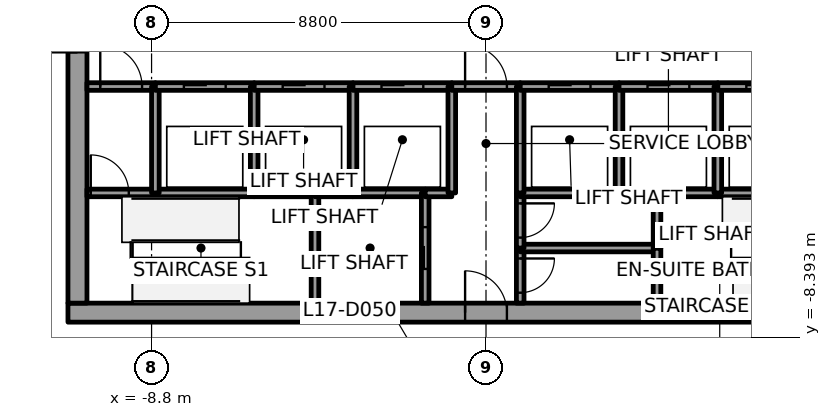
"""IFC4 building model, lengths in metres.
Left out: names, types, materials, properties, quantities, classifications, styles, units other than length and angle.
Written with IfcOpenShell. Run it as: python <this file> out.ifc"""

import sys

from ifc_helpers import new_model, si_unit, direction, frame, frame_2d, origin, place, context, subcontext, project, spatial, rectangle, extrude, element, fill, save


model = new_model("IFC4")
c1 = context("Model", 3, precision=1e-05, world=origin(), true_north=direction((0.0, 1.0)))
c2 = subcontext(c1, "Body", "Model", "MODEL_VIEW")
j1 = project(units=[si_unit("LENGTHUNIT", "METRE"), si_unit("PLANEANGLEUNIT", "RADIAN")], contexts=[c1])
p1 = place(None, origin())
s1 = spatial("IfcSite", under=j1, at=p1, CompositionType="ELEMENT")
p2 = place(p1, origin())
s2 = spatial("IfcBuilding", under=s1, at=p2, CompositionType="ELEMENT")
p3 = place(p2, frame((0.0, 0.0, 85.0)))
s3 = spatial("IfcBuildingStorey", under=s2, at=p3, CompositionType="ELEMENT", Elevation=85.0)
p4 = place(p3, frame((-11.0, -7.75, 0.0), z_axis=(0.0, 0.0, 1.0), x_axis=(1.0, 0.0, 0.0)))
e1 = element("IfcWall", 1, at=p4, inside=s3, PredefinedType="SHEAR", context=c2, shape_type="SweptSolid", body=[
    extrude(rectangle(XDim=22.0, YDim=0.5, at=frame_2d((11.0, 0.0))), origin(), (0.0, 0.0, 1.0), 3.7),
])
p5 = place(p4, frame((10.45, 0.0, 0.0)))
e2 = element("IfcOpeningElement", 2, at=p5, cuts=e1, PredefinedType="OPENING", context=c2, shape_type="SweptSolid", body=[
    extrude(rectangle(XDim=1.1, YDim=2.1, at=frame_2d((0.55, 1.05))), frame((0.0, 0.25, 0.0), z_axis=(0.0, -1.0, 0.0), x_axis=(1.0, 0.0, 0.0)), (0.0, 0.0, 1.0), 0.5),
])
p6 = place(p3, frame((-10.75, -7.5, 0.0), z_axis=(0.0, 0.0, 1.0), x_axis=(0.0, 1.0, 0.0)))
e3 = element("IfcWall", 3, at=p6, inside=s3, PredefinedType="SHEAR", context=c2, shape_type="SweptSolid", body=[
    extrude(rectangle(XDim=15.0, YDim=0.5, at=frame_2d((7.5, 0.0))), origin(), (0.0, 0.0, 1.0), 3.7),
])
p7 = place(p6, frame((6.6, 0.0, 0.0)))
e4 = element("IfcOpeningElement", 4, at=p7, cuts=e3, PredefinedType="OPENING", context=c2, shape_type="SweptSolid", body=[
    extrude(rectangle(XDim=1.8, YDim=2.1, at=frame_2d((0.9, 1.05))), frame((0.0, 0.25, 0.0), z_axis=(0.0, -1.0, 0.0), x_axis=(1.0, 0.0, 0.0)), (0.0, 0.0, 1.0), 0.5),
])
p8 = place(p3, frame((-10.5, -4.6, 0.0), z_axis=(0.0, 0.0, 1.0), x_axis=(1.0, 0.0, 0.0)))
e5 = element("IfcWall", 5, at=p8, inside=s3, PredefinedType="SOLIDWALL", context=c2, shape_type="SweptSolid", body=[
    extrude(rectangle(XDim=1.8, YDim=0.2, at=frame_2d((0.9, 0.0))), origin(), (0.0, 0.0, 1.0), 3.55),
])
p9 = place(p8, frame((0.1, 0.0, 0.0)))
e6 = element("IfcOpeningElement", 6, at=p9, cuts=e5, PredefinedType="OPENING", context=c2, shape_type="SweptSolid", body=[
    extrude(rectangle(XDim=1.0, YDim=2.1, at=frame_2d((0.5, 1.05))), frame((0.0, 0.1, 0.0), z_axis=(0.0, -1.0, 0.0), x_axis=(1.0, 0.0, 0.0)), (0.0, 0.0, 1.0), 0.2),
])
p10 = place(p3, frame((-10.5, -1.8, 0.0), z_axis=(0.0, 0.0, 1.0), x_axis=(1.0, 0.0, 0.0)))
e7 = element("IfcWall", 7, at=p10, inside=s3, PredefinedType="SOLIDWALL", context=c2, shape_type="SweptSolid", body=[
    extrude(rectangle(XDim=1.8, YDim=0.2, at=frame_2d((0.9, 0.0))), origin(), (0.0, 0.0, 1.0), 3.55),
])
p11 = place(p10, frame((0.35, 0.0, 0.0)))
e8 = element("IfcOpeningElement", 8, at=p11, cuts=e7, PredefinedType="OPENING", context=c2, shape_type="SweptSolid", body=[
    extrude(rectangle(XDim=1.1, YDim=2.1, at=frame_2d((0.55, 1.05))), frame((0.0, 0.1, 0.0), z_axis=(0.0, -1.0, 0.0), x_axis=(1.0, 0.0, 0.0)), (0.0, 0.0, 1.0), 0.2),
])
p12 = place(p3, frame((-8.7, -4.6, 0.0), z_axis=(0.0, 0.0, 1.0), x_axis=(1.0, 0.0, 0.0)))
e9 = element("IfcWall", 9, at=p12, inside=s3, PredefinedType="SOLIDWALL", context=c2, shape_type="SweptSolid", body=[
    extrude(rectangle(XDim=2.6, YDim=0.2, at=frame_2d((1.3, 0.0))), origin(), (0.0, 0.0, 1.0), 3.55),
])
p13 = place(p3, frame((-8.7, -4.6, 0.0), z_axis=(0.0, 0.0, 1.0), x_axis=(0.0, 1.0, 0.0)))
e10 = element("IfcWall", 10, at=p13, inside=s3, PredefinedType="SOLIDWALL", context=c2, shape_type="SweptSolid", body=[
    extrude(rectangle(XDim=2.8, YDim=0.2, at=frame_2d((1.4, 0.0))), origin(), (0.0, 0.0, 1.0), 3.55),
])
p14 = place(p3, frame((-8.7, -1.8, 0.0), z_axis=(0.0, 0.0, 1.0), x_axis=(1.0, 0.0, 0.0)))
e11 = element("IfcWall", 11, at=p14, inside=s3, PredefinedType="SOLIDWALL", context=c2, shape_type="SweptSolid", body=[
    extrude(rectangle(XDim=2.6, YDim=0.2, at=frame_2d((1.3, 0.0))), origin(), (0.0, 0.0, 1.0), 3.55),
])
p15 = place(p14, frame((0.75, 0.0, 0.0)))
e12 = element("IfcOpeningElement", 12, at=p15, cuts=e11, PredefinedType="OPENING", context=c2, shape_type="SweptSolid", body=[
    extrude(rectangle(XDim=1.1, YDim=2.1, at=frame_2d((0.55, 1.05))), frame((0.0, 0.1, 0.0), z_axis=(0.0, -1.0, 0.0), x_axis=(1.0, 0.0, 0.0)), (0.0, 0.0, 1.0), 0.2),
])
p16 = place(p3, frame((-6.1, -4.6, 0.0), z_axis=(0.0, 0.0, 1.0), x_axis=(1.0, 0.0, 0.0)))
e13 = element("IfcWall", 13, at=p16, inside=s3, PredefinedType="SOLIDWALL", context=c2, shape_type="SweptSolid", body=[
    extrude(rectangle(XDim=1.6, YDim=0.2, at=frame_2d((0.8, 0.0))), origin(), (0.0, 0.0, 1.0), 3.55),
])
p17 = place(p3, frame((-6.1, -4.6, 0.0), z_axis=(0.0, 0.0, 1.0), x_axis=(0.0, 1.0, 0.0)))
e14 = element("IfcWall", 14, at=p17, inside=s3, PredefinedType="SOLIDWALL", context=c2, shape_type="SweptSolid", body=[
    extrude(rectangle(XDim=2.8, YDim=0.2, at=frame_2d((1.4, 0.0))), origin(), (0.0, 0.0, 1.0), 3.55),
])
p18 = place(p3, frame((-6.1, -1.8, 0.0), z_axis=(0.0, 0.0, 1.0), x_axis=(1.0, 0.0, 0.0)))
e15 = element("IfcWall", 15, at=p18, inside=s3, PredefinedType="SOLIDWALL", context=c2, shape_type="SweptSolid", body=[
    extrude(rectangle(XDim=2.6, YDim=0.2, at=frame_2d((1.3, 0.0))), origin(), (0.0, 0.0, 1.0), 3.55),
])
p19 = place(p18, frame((0.75, 0.0, 0.0)))
e16 = element("IfcOpeningElement", 16, at=p19, cuts=e15, PredefinedType="OPENING", context=c2, shape_type="SweptSolid", body=[
    extrude(rectangle(XDim=1.1, YDim=2.1, at=frame_2d((0.55, 1.05))), frame((0.0, 0.1, 0.0), z_axis=(0.0, -1.0, 0.0), x_axis=(1.0, 0.0, 0.0)), (0.0, 0.0, 1.0), 0.2),
])
p20 = place(p3, frame((-4.5, -4.6, 0.0), z_axis=(0.0, 0.0, 1.0), x_axis=(0.0, -1.0, 0.0)))
e17 = element("IfcWall", 17, at=p20, inside=s3, PredefinedType="SOLIDWALL", context=c2, shape_type="SweptSolid", body=[
    extrude(rectangle(XDim=2.9, YDim=0.2, at=frame_2d((1.45, 0.0))), origin(), (0.0, 0.0, 1.0), 3.55),
])
p21 = place(p3, frame((-4.5, -4.6, 0.0), z_axis=(0.0, 0.0, 1.0), x_axis=(1.0, 0.0, 0.0)))
e18 = element("IfcWall", 18, at=p21, inside=s3, PredefinedType="SOLIDWALL", context=c2, shape_type="SweptSolid", body=[
    extrude(rectangle(XDim=1.0, YDim=0.2, at=frame_2d((0.5, 0.0))), origin(), (0.0, 0.0, 1.0), 3.55),
])
p22 = place(p3, frame((-3.5, -4.6, 0.0), z_axis=(0.0, 0.0, 1.0), x_axis=(1.0, 0.0, 0.0)))
e19 = element("IfcWall", 19, at=p22, inside=s3, PredefinedType="SOLIDWALL", context=c2, shape_type="SweptSolid", body=[
    extrude(rectangle(XDim=1.9, YDim=0.2, at=frame_2d((0.95, 0.0))), origin(), (0.0, 0.0, 1.0), 3.55),
])
p23 = place(p3, frame((-3.5, -4.6, 0.0), z_axis=(0.0, 0.0, 1.0), x_axis=(0.0, 1.0, 0.0)))
e20 = element("IfcWall", 20, at=p23, inside=s3, PredefinedType="SOLIDWALL", context=c2, shape_type="SweptSolid", body=[
    extrude(rectangle(XDim=2.8, YDim=0.2, at=frame_2d((1.4, 0.0))), origin(), (0.0, 0.0, 1.0), 3.55),
])
p24 = place(p3, frame((-3.5, -1.8, 0.0), z_axis=(0.0, 0.0, 1.0), x_axis=(1.0, 0.0, 0.0)))
e21 = element("IfcWall", 21, at=p24, inside=s3, PredefinedType="SOLIDWALL", context=c2, shape_type="SweptSolid", body=[
    extrude(rectangle(XDim=2.6, YDim=0.2, at=frame_2d((1.3, 0.0))), origin(), (0.0, 0.0, 1.0), 3.55),
])
p25 = place(p24, frame((0.75, 0.0, 0.0)))
e22 = element("IfcOpeningElement", 22, at=p25, cuts=e21, PredefinedType="OPENING", context=c2, shape_type="SweptSolid", body=[
    extrude(rectangle(XDim=1.1, YDim=2.1, at=frame_2d((0.55, 1.05))), frame((0.0, 0.1, 0.0), z_axis=(0.0, -1.0, 0.0), x_axis=(1.0, 0.0, 0.0)), (0.0, 0.0, 1.0), 0.2),
])
p26 = place(p3, frame((-1.6, -7.5, 0.0), z_axis=(0.0, 0.0, 1.0), x_axis=(0.0, 1.0, 0.0)))
e23 = element("IfcWall", 23, at=p26, inside=s3, PredefinedType="SOLIDWALL", context=c2, shape_type="SweptSolid", body=[
    extrude(rectangle(XDim=2.9, YDim=0.2, at=frame_2d((1.45, 0.0))), origin(), (0.0, 0.0, 1.0), 3.55),
])
p27 = place(p26, frame((0.9, 0.0, 0.0)))
e24 = element("IfcOpeningElement", 24, at=p27, cuts=e23, PredefinedType="OPENING", context=c2, shape_type="SweptSolid", body=[
    extrude(rectangle(XDim=1.1, YDim=2.1, at=frame_2d((0.55, 1.05))), frame((0.0, 0.1, 0.0), z_axis=(0.0, -1.0, 0.0), x_axis=(1.0, 0.0, 0.0)), (0.0, 0.0, 1.0), 0.2),
])
p28 = place(p3, frame((-1.6, -4.6, 0.0), z_axis=(0.0, 0.0, 1.0), x_axis=(1.0, 0.0, 0.0)))
e25 = element("IfcWall", 25, at=p28, inside=s3, PredefinedType="SOLIDWALL", context=c2, shape_type="SweptSolid", body=[
    extrude(rectangle(XDim=0.7, YDim=0.2, at=frame_2d((0.35, 0.0))), origin(), (0.0, 0.0, 1.0), 3.55),
])
p29 = place(p3, frame((-0.9, -4.6, 0.0), z_axis=(0.0, 0.0, 1.0), x_axis=(0.0, 1.0, 0.0)))
e26 = element("IfcWall", 26, at=p29, inside=s3, PredefinedType="SOLIDWALL", context=c2, shape_type="SweptSolid", body=[
    extrude(rectangle(XDim=2.8, YDim=0.2, at=frame_2d((1.4, 0.0))), origin(), (0.0, 0.0, 1.0), 3.55),
])
p30 = place(p3, frame((-0.9, -1.8, 0.0), z_axis=(0.0, 0.0, 1.0), x_axis=(1.0, 0.0, 0.0)))
e27 = element("IfcWall", 27, at=p30, inside=s3, PredefinedType="SOLIDWALL", context=c2, shape_type="SweptSolid", body=[
    extrude(rectangle(XDim=1.8, YDim=0.2, at=frame_2d((0.9, 0.0))), origin(), (0.0, 0.0, 1.0), 3.55),
])
p31 = place(p30, frame((0.35, 0.0, 0.0)))
e28 = element("IfcOpeningElement", 28, at=p31, cuts=e27, PredefinedType="OPENING", context=c2, shape_type="SweptSolid", body=[
    extrude(rectangle(XDim=1.1, YDim=2.1, at=frame_2d((0.55, 1.05))), frame((0.0, 0.1, 0.0), z_axis=(0.0, -1.0, 0.0), x_axis=(1.0, 0.0, 0.0)), (0.0, 0.0, 1.0), 0.2),
])
p32 = place(p3, frame((0.9, -6.05, 0.0), z_axis=(0.0, 0.0, 1.0), x_axis=(0.0, -1.0, 0.0)))
e29 = element("IfcWall", 29, at=p32, inside=s3, PredefinedType="SOLIDWALL", context=c2, shape_type="SweptSolid", body=[
    extrude(rectangle(XDim=1.45, YDim=0.2, at=frame_2d((0.725, 0.0))), origin(), (0.0, 0.0, 1.0), 3.55),
])
p33 = place(p32, frame((0.275, 0.0, 0.0)))
e30 = element("IfcOpeningElement", 30, at=p33, cuts=e29, PredefinedType="OPENING", context=c2, shape_type="SweptSolid", body=[
    extrude(rectangle(XDim=0.9, YDim=2.1, at=frame_2d((0.45, 1.05))), frame((0.0, 0.1, 0.0), z_axis=(0.0, -1.0, 0.0), x_axis=(1.0, 0.0, 0.0)), (0.0, 0.0, 1.0), 0.2),
])
p34 = place(p3, frame((4.5, -6.05, 0.0), z_axis=(0.0, 0.0, 1.0), x_axis=(-1.0, 0.0, 0.0)))
e31 = element("IfcWall", 31, at=p34, inside=s3, PredefinedType="SOLIDWALL", context=c2, shape_type="SweptSolid", body=[
    extrude(rectangle(XDim=3.6, YDim=0.2, at=frame_2d((1.8, 0.0))), origin(), (0.0, 0.0, 1.0), 3.55),
])
p35 = place(p3, frame((0.9, -4.6, 0.0), z_axis=(0.0, 0.0, 1.0), x_axis=(0.0, -1.0, 0.0)))
e32 = element("IfcWall", 32, at=p35, inside=s3, PredefinedType="SOLIDWALL", context=c2, shape_type="SweptSolid", body=[
    extrude(rectangle(XDim=1.45, YDim=0.2, at=frame_2d((0.725, 0.0))), origin(), (0.0, 0.0, 1.0), 3.55),
])
p36 = place(p35, frame((0.275, 0.0, 0.0)))
e33 = element("IfcOpeningElement", 33, at=p36, cuts=e32, PredefinedType="OPENING", context=c2, shape_type="SweptSolid", body=[
    extrude(rectangle(XDim=0.9, YDim=2.1, at=frame_2d((0.45, 1.05))), frame((0.0, 0.1, 0.0), z_axis=(0.0, -1.0, 0.0), x_axis=(1.0, 0.0, 0.0)), (0.0, 0.0, 1.0), 0.2),
])
p37 = place(p3, frame((3.5, -4.6, 0.0), z_axis=(0.0, 0.0, 1.0), x_axis=(-1.0, 0.0, 0.0)))
e34 = element("IfcWall", 34, at=p37, inside=s3, PredefinedType="SOLIDWALL", context=c2, shape_type="SweptSolid", body=[
    extrude(rectangle(XDim=2.6, YDim=0.2, at=frame_2d((1.3, 0.0))), origin(), (0.0, 0.0, 1.0), 3.55),
])
p38 = place(p3, frame((0.9, -1.8, 0.0), z_axis=(0.0, 0.0, 1.0), x_axis=(0.0, -1.0, 0.0)))
e35 = element("IfcWall", 35, at=p38, inside=s3, PredefinedType="SOLIDWALL", context=c2, shape_type="SweptSolid", body=[
    extrude(rectangle(XDim=2.8, YDim=0.2, at=frame_2d((1.4, 0.0))), origin(), (0.0, 0.0, 1.0), 3.55),
])
p39 = place(p3, frame((0.9, -1.8, 0.0), z_axis=(0.0, 0.0, 1.0), x_axis=(1.0, 0.0, 0.0)))
e36 = element("IfcWall", 36, at=p39, inside=s3, PredefinedType="SOLIDWALL", context=c2, shape_type="SweptSolid", body=[
    extrude(rectangle(XDim=2.6, YDim=0.2, at=frame_2d((1.3, 0.0))), origin(), (0.0, 0.0, 1.0), 3.55),
])
p40 = place(p39, frame((0.75, 0.0, 0.0)))
e37 = element("IfcOpeningElement", 37, at=p40, cuts=e36, PredefinedType="OPENING", context=c2, shape_type="SweptSolid", body=[
    extrude(rectangle(XDim=1.1, YDim=2.1, at=frame_2d((0.55, 1.05))), frame((0.0, 0.1, 0.0), z_axis=(0.0, -1.0, 0.0), x_axis=(1.0, 0.0, 0.0)), (0.0, 0.0, 1.0), 0.2),
])
p41 = place(p3, frame((4.5, -4.6, 0.0), z_axis=(0.0, 0.0, 1.0), x_axis=(-1.0, 0.0, 0.0)))
e38 = element("IfcWall", 38, at=p41, inside=s3, PredefinedType="SOLIDWALL", context=c2, shape_type="SweptSolid", body=[
    extrude(rectangle(XDim=1.0, YDim=0.2, at=frame_2d((0.5, 0.0))), origin(), (0.0, 0.0, 1.0), 3.55),
])
p42 = place(p3, frame((3.5, -4.6, 0.0), z_axis=(0.0, 0.0, 1.0), x_axis=(0.0, 1.0, 0.0)))
e39 = element("IfcWall", 39, at=p42, inside=s3, PredefinedType="SOLIDWALL", context=c2, shape_type="SweptSolid", body=[
    extrude(rectangle(XDim=2.8, YDim=0.2, at=frame_2d((1.4, 0.0))), origin(), (0.0, 0.0, 1.0), 3.55),
])
p43 = place(p3, frame((3.5, -1.8, 0.0), z_axis=(0.0, 0.0, 1.0), x_axis=(1.0, 0.0, 0.0)))
e40 = element("IfcWall", 40, at=p43, inside=s3, PredefinedType="SOLIDWALL", context=c2, shape_type="SweptSolid", body=[
    extrude(rectangle(XDim=2.6, YDim=0.2, at=frame_2d((1.3, 0.0))), origin(), (0.0, 0.0, 1.0), 3.55),
])
p44 = place(p43, frame((0.75, 0.0, 0.0)))
e41 = element("IfcOpeningElement", 41, at=p44, cuts=e40, PredefinedType="OPENING", context=c2, shape_type="SweptSolid", body=[
    extrude(rectangle(XDim=1.1, YDim=2.1, at=frame_2d((0.55, 1.05))), frame((0.0, 0.1, 0.0), z_axis=(0.0, -1.0, 0.0), x_axis=(1.0, 0.0, 0.0)), (0.0, 0.0, 1.0), 0.2),
])
for number, where, z_axis, x_axis in (
    (42, (4.5, -7.5, 0.0), (0.0, 0.0, 1.0), (0.0, 1.0, 0.0)),
    (43, (4.5, -6.05, 0.0), (0.0, 0.0, 1.0), (0.0, 1.0, 0.0)),
):
    element("IfcWall", number, at=place(p3, frame(where, z_axis=z_axis, x_axis=x_axis)), inside=s3, PredefinedType="SOLIDWALL", context=c2, shape_type="SweptSolid", body=[
        extrude(rectangle(XDim=1.45, YDim=0.2, at=frame_2d((0.725, 0.0))), origin(), (0.0, 0.0, 1.0), 3.55),
    ])
p45 = place(p3, frame((4.5, -4.6, 0.0), z_axis=(0.0, 0.0, 1.0), x_axis=(1.0, 0.0, 0.0)))
e44 = element("IfcWall", 44, at=p45, inside=s3, PredefinedType="SOLIDWALL", context=c2, shape_type="SweptSolid", body=[
    extrude(rectangle(XDim=1.6, YDim=0.2, at=frame_2d((0.8, 0.0))), origin(), (0.0, 0.0, 1.0), 3.55),
])
p46 = place(p3, frame((6.1, -4.6, 0.0), z_axis=(0.0, 0.0, 1.0), x_axis=(1.0, 0.0, 0.0)))
e45 = element("IfcWall", 45, at=p46, inside=s3, PredefinedType="SOLIDWALL", context=c2, shape_type="SweptSolid", body=[
    extrude(rectangle(XDim=2.6, YDim=0.2, at=frame_2d((1.3, 0.0))), origin(), (0.0, 0.0, 1.0), 3.55),
])
p47 = place(p3, frame((6.1, -4.6, 0.0), z_axis=(0.0, 0.0, 1.0), x_axis=(0.0, 1.0, 0.0)))
e46 = element("IfcWall", 46, at=p47, inside=s3, PredefinedType="SOLIDWALL", context=c2, shape_type="SweptSolid", body=[
    extrude(rectangle(XDim=2.8, YDim=0.2, at=frame_2d((1.4, 0.0))), origin(), (0.0, 0.0, 1.0), 3.55),
])
p48 = place(p3, frame((6.1, -1.8, 0.0), z_axis=(0.0, 0.0, 1.0), x_axis=(1.0, 0.0, 0.0)))
e47 = element("IfcWall", 47, at=p48, inside=s3, PredefinedType="SOLIDWALL", context=c2, shape_type="SweptSolid", body=[
    extrude(rectangle(XDim=2.6, YDim=0.2, at=frame_2d((1.3, 0.0))), origin(), (0.0, 0.0, 1.0), 3.55),
])
p49 = place(p48, frame((0.75, 0.0, 0.0)))
e48 = element("IfcOpeningElement", 48, at=p49, cuts=e47, PredefinedType="OPENING", context=c2, shape_type="SweptSolid", body=[
    extrude(rectangle(XDim=1.1, YDim=2.1, at=frame_2d((0.55, 1.05))), frame((0.0, 0.1, 0.0), z_axis=(0.0, -1.0, 0.0), x_axis=(1.0, 0.0, 0.0)), (0.0, 0.0, 1.0), 0.2),
])
p50 = place(p15, origin())
e49 = element("IfcDoor", 49, at=p50, inside=s3, OperationType="SLIDING_TO_RIGHT", PredefinedType="DOOR", context=c2, shape_type="SweptSolid", body=[
    extrude(rectangle(XDim=1.1, YDim=2.1, at=frame_2d((0.55, 1.05))), frame((0.0, 0.025, 0.0), z_axis=(0.0, -1.0, 0.0), x_axis=(1.0, 0.0, 0.0)), (0.0, 0.0, 1.0), 0.05),
])
fill(e12, e49)
p51 = place(p19, origin())
e50 = element("IfcDoor", 50, at=p51, inside=s3, OperationType="SLIDING_TO_RIGHT", PredefinedType="DOOR", context=c2, shape_type="SweptSolid", body=[
    extrude(rectangle(XDim=1.1, YDim=2.1, at=frame_2d((0.55, 1.05))), frame((0.0, 0.025, 0.0), z_axis=(0.0, -1.0, 0.0), x_axis=(1.0, 0.0, 0.0)), (0.0, 0.0, 1.0), 0.05),
])
fill(e16, e50)
p52 = place(p25, origin())
e51 = element("IfcDoor", 51, at=p52, inside=s3, OperationType="SLIDING_TO_RIGHT", PredefinedType="DOOR", context=c2, shape_type="SweptSolid", body=[
    extrude(rectangle(XDim=1.1, YDim=2.1, at=frame_2d((0.55, 1.05))), frame((0.0, 0.025, 0.0), z_axis=(0.0, -1.0, 0.0), x_axis=(1.0, 0.0, 0.0)), (0.0, 0.0, 1.0), 0.05),
])
fill(e22, e51)
p53 = place(p40, origin())
e52 = element("IfcDoor", 52, at=p53, inside=s3, OperationType="SLIDING_TO_RIGHT", PredefinedType="DOOR", context=c2, shape_type="SweptSolid", body=[
    extrude(rectangle(XDim=1.1, YDim=2.1, at=frame_2d((0.55, 1.05))), frame((0.0, 0.025, 0.0), z_axis=(0.0, -1.0, 0.0), x_axis=(1.0, 0.0, 0.0)), (0.0, 0.0, 1.0), 0.05),
])
fill(e37, e52)
p54 = place(p44, origin())
e53 = element("IfcDoor", 53, at=p54, inside=s3, OperationType="SLIDING_TO_LEFT", PredefinedType="DOOR", context=c2, shape_type="SweptSolid", body=[
    extrude(rectangle(XDim=1.1, YDim=2.1, at=frame_2d((0.55, 1.05))), frame((0.0, 0.025, 0.0), z_axis=(0.0, -1.0, 0.0), x_axis=(1.0, 0.0, 0.0)), (0.0, 0.0, 1.0), 0.05),
])
fill(e41, e53)
p55 = place(p49, origin())
e54 = element("IfcDoor", 54, at=p55, inside=s3, OperationType="SLIDING_TO_RIGHT", PredefinedType="DOOR", context=c2, shape_type="SweptSolid", body=[
    extrude(rectangle(XDim=1.1, YDim=2.1, at=frame_2d((0.55, 1.05))), frame((0.0, 0.025, 0.0), z_axis=(0.0, -1.0, 0.0), x_axis=(1.0, 0.0, 0.0)), (0.0, 0.0, 1.0), 0.05),
])
fill(e48, e54)
p56 = place(p27, origin())
e55 = element("IfcDoor", 55, at=p56, inside=s3, OperationType="SLIDING_TO_RIGHT", PredefinedType="DOOR", context=c2, shape_type="SweptSolid", body=[
    extrude(rectangle(XDim=1.1, YDim=2.1, at=frame_2d((0.55, 1.05))), frame((0.0, 0.025, 0.0), z_axis=(0.0, -1.0, 0.0), x_axis=(1.0, 0.0, 0.0)), (0.0, 0.0, 1.0), 0.05),
])
fill(e24, e55)
p57 = place(p11, origin())
e56 = element("IfcDoor", 56, at=p57, inside=s3, OperationType="SINGLE_SWING_RIGHT", PredefinedType="DOOR", context=c2, shape_type="SweptSolid", body=[
    extrude(rectangle(XDim=1.1, YDim=2.1, at=frame_2d((0.55, 1.05))), frame((0.0, 0.025, 0.0), z_axis=(0.0, -1.0, 0.0), x_axis=(1.0, 0.0, 0.0)), (0.0, 0.0, 1.0), 0.05),
])
fill(e8, e56)
p58 = place(p31, origin())
e57 = element("IfcDoor", 57, at=p58, inside=s3, OperationType="SINGLE_SWING_RIGHT", PredefinedType="DOOR", context=c2, shape_type="SweptSolid", body=[
    extrude(rectangle(XDim=1.1, YDim=2.1, at=frame_2d((0.55, 1.05))), frame((0.0, 0.025, 0.0), z_axis=(0.0, -1.0, 0.0), x_axis=(1.0, 0.0, 0.0)), (0.0, 0.0, 1.0), 0.05),
])
fill(e28, e57)
p59 = place(p9, origin())
e58 = element("IfcDoor", 58, at=p59, inside=s3, OperationType="SINGLE_SWING_LEFT", PredefinedType="DOOR", context=c2, shape_type="SweptSolid", body=[
    extrude(rectangle(XDim=1.0, YDim=2.1, at=frame_2d((0.5, 1.05))), frame((0.0, 0.025, 0.0), z_axis=(0.0, -1.0, 0.0), x_axis=(1.0, 0.0, 0.0)), (0.0, 0.0, 1.0), 0.05),
])
fill(e6, e58)
p60 = place(p33, origin())
e59 = element("IfcDoor", 59, at=p60, inside=s3, OperationType="SINGLE_SWING_LEFT", PredefinedType="DOOR", context=c2, shape_type="SweptSolid", body=[
    extrude(rectangle(XDim=0.9, YDim=2.1, at=frame_2d((0.45, 1.05))), frame((0.0, 0.025, 0.0), z_axis=(0.0, -1.0, 0.0), x_axis=(1.0, 0.0, 0.0)), (0.0, 0.0, 1.0), 0.05),
])
fill(e30, e59)
p61 = place(p36, origin())
e60 = element("IfcDoor", 60, at=p61, inside=s3, OperationType="SINGLE_SWING_RIGHT", PredefinedType="DOOR", context=c2, shape_type="SweptSolid", body=[
    extrude(rectangle(XDim=0.9, YDim=2.1, at=frame_2d((0.45, 1.05))), frame((0.0, 0.025, 0.0), z_axis=(0.0, -1.0, 0.0), x_axis=(1.0, 0.0, 0.0)), (0.0, 0.0, 1.0), 0.05),
])
fill(e33, e60)
p62 = place(p7, origin())
e61 = element("IfcDoor", 61, at=p62, inside=s3, OperationType="DOUBLE_DOOR_SINGLE_SWING", PredefinedType="DOOR", context=c2, shape_type="SweptSolid", body=[
    extrude(rectangle(XDim=1.8, YDim=2.1, at=frame_2d((0.9, 1.05))), frame((0.0, 0.025, 0.0), z_axis=(0.0, -1.0, 0.0), x_axis=(1.0, 0.0, 0.0)), (0.0, 0.0, 1.0), 0.05),
])
fill(e4, e61)
p63 = place(p5, origin())
e62 = element("IfcDoor", 62, at=p63, inside=s3, OperationType="SINGLE_SWING_LEFT", PredefinedType="DOOR", context=c2, shape_type="SweptSolid", body=[
    extrude(rectangle(XDim=1.1, YDim=2.1, at=frame_2d((0.55, 1.05))), frame((0.0, 0.025, 0.0), z_axis=(0.0, -1.0, 0.0), x_axis=(1.0, 0.0, 0.0)), (0.0, 0.0, 1.0), 0.05),
])
fill(e2, e62)
save(model, sys.argv[1])
